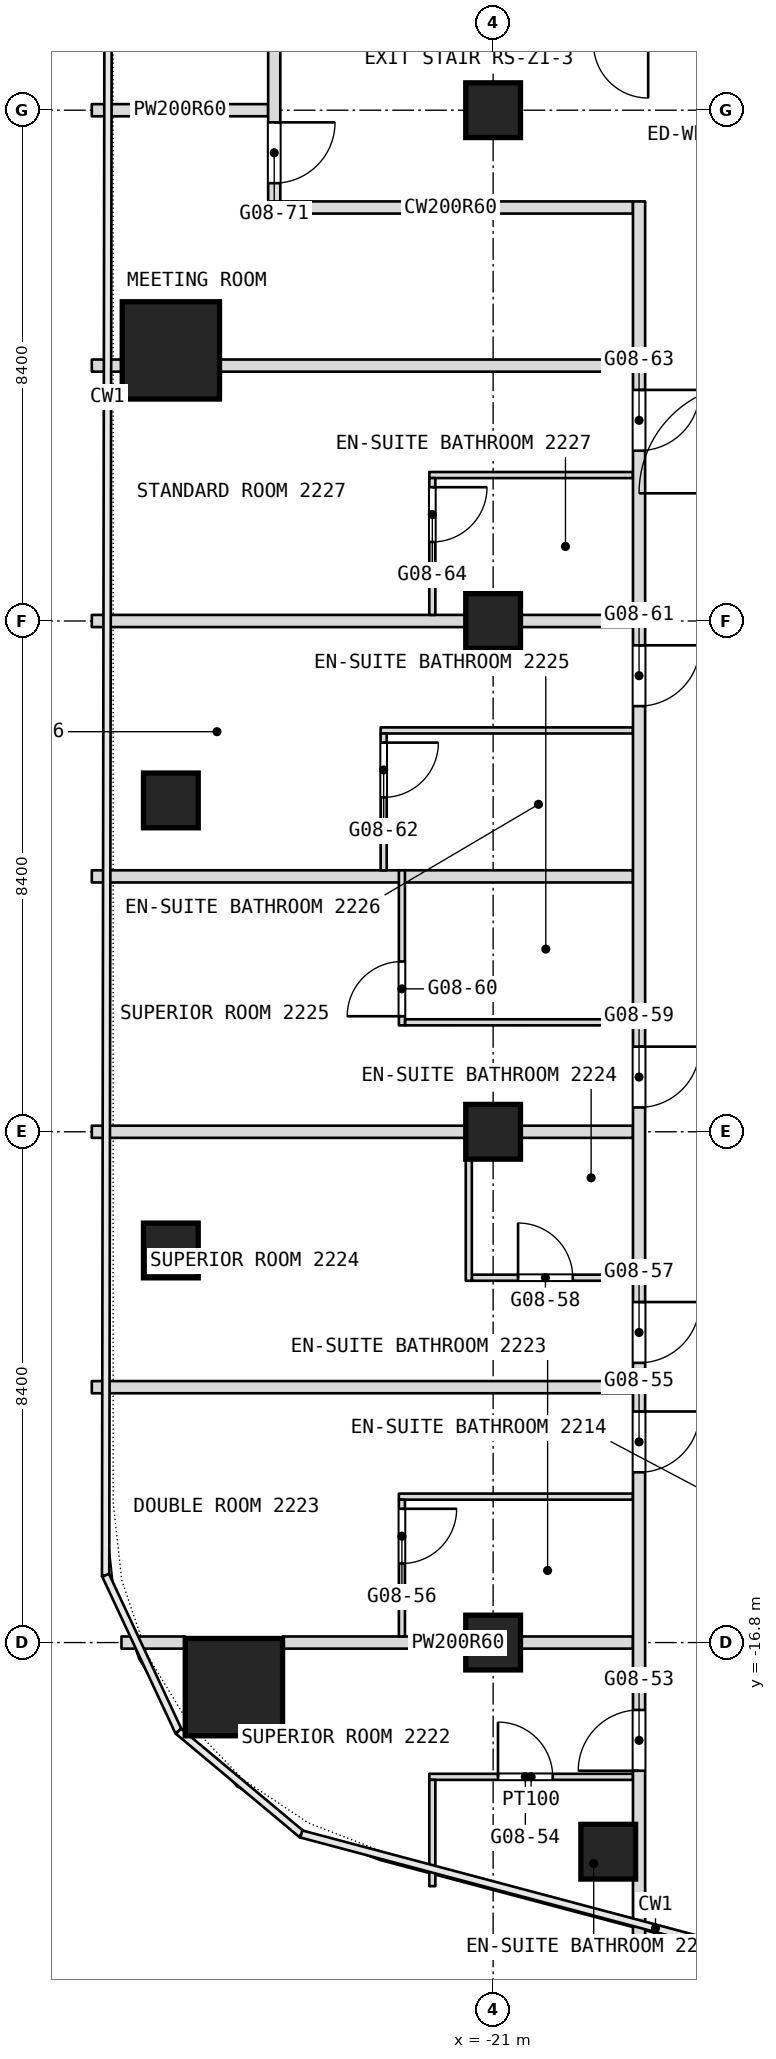
"""IFC4 building model, lengths in metres.
Left out: names, types, materials, properties, quantities, classifications, styles, units other than length and angle.
Written with IfcOpenShell. Run it as: python <this file> out.ifc"""

import sys

from ifc_helpers import new_model, si_unit, direction, frame, frame_2d, origin, origin_2d, place, context, subcontext, project, spatial, rectangle, extrude, element, fill, save


model = new_model("IFC4")
c1 = context("Model", 3, precision=1e-05, world=origin(), true_north=direction((0.0, 1.0)))
c2 = subcontext(c1, "Body", "Model", "MODEL_VIEW")
j1 = project(units=[si_unit("LENGTHUNIT", "METRE"), si_unit("PLANEANGLEUNIT", "RADIAN")], contexts=[c1])
p1 = place(None, origin())
s1 = spatial("IfcSite", under=j1, at=p1, CompositionType="ELEMENT")
p2 = place(p1, origin())
s2 = spatial("IfcBuilding", under=s1, at=p2, CompositionType="ELEMENT")
p3 = place(p2, frame((0.0, 0.0, 104.9)))
s3 = spatial("IfcBuildingStorey", under=s2, at=p3, CompositionType="ELEMENT", Elevation=104.9)
for number, where, z_axis, x_axis in (
    (1, (-25.263, -17.533, 0.0), (0.0, 0.0, 1.0), (1.0, 0.0, 0.0)),
    (2, (-26.3, 4.45, 0.0), (0.0, 0.0, 1.0), (1.0, 0.0, 0.0)),
):
    element("IfcColumn", number, at=place(p3, frame(where, z_axis=z_axis, x_axis=x_axis)), inside=s3, PredefinedType="COLUMN", context=c2, shape_type="SweptSolid", body=[
        extrude(rectangle(XDim=1.6, YDim=1.6, at=origin_2d()), origin(), (0.0, 0.0, 1.0), 3.6),
    ])
for number, where, z_axis, x_axis in (
    (3, (-21.0, -16.8, 0.0), (0.0, 0.0, 1.0), (1.0, 0.0, 0.0)),
    (4, (-21.0, -8.4, 0.0), (0.0, 0.0, 1.0), (1.0, 0.0, 0.0)),
    (5, (-21.0, 0.0, 0.0), (0.0, 0.0, 1.0), (1.0, 0.0, 0.0)),
    (6, (-21.0, 8.4, 0.0), (0.0, 0.0, 1.0), (1.0, 0.0, 0.0)),
    (7, (-26.3, -10.352, 0.0), (0.0, 0.0, 1.0), (1.0, 0.0, 0.0)),
    (8, (-26.3, -2.951, 0.0), (0.0, 0.0, 1.0), (1.0, 0.0, 0.0)),
    (9, (-19.107, -20.239, 0.0), (0.0, 0.0, 1.0), (1.0, 0.0, 0.0)),
):
    element("IfcColumn", number, at=place(p3, frame(where, z_axis=z_axis, x_axis=x_axis)), inside=s3, PredefinedType="COLUMN", context=c2, shape_type="SweptSolid", body=[
        extrude(rectangle(XDim=0.9, YDim=0.9, at=origin_2d()), origin(), (0.0, 0.0, 1.0), 3.6),
    ])
p4 = place(p3, frame((-22.05, -19.008, 0.0), z_axis=(0.0, 0.0, 1.0), x_axis=(1.0, 0.0, 0.0)))
e10 = element("IfcWall", 10, at=p4, inside=s3, PredefinedType="PARTITIONING", context=c2, shape_type="SweptSolid", body=[
    extrude(rectangle(XDim=3.35, YDim=0.1, at=frame_2d((1.675, 0.0))), origin(), (0.0, 0.0, 1.0), 3.34),
])
p5 = place(p4, frame((1.13, 0.0, 0.0)))
e11 = element("IfcOpeningElement", 11, at=p5, cuts=e10, PredefinedType="OPENING", context=c2, shape_type="SweptSolid", body=[
    extrude(rectangle(XDim=0.9, YDim=2.1, at=frame_2d((0.45, 1.05))), frame((0.0, 0.05, 0.0), z_axis=(0.0, -1.0, 0.0), x_axis=(1.0, 0.0, 0.0)), (0.0, 0.0, 1.0), 0.1),
])
p6 = place(p3, frame((-27.112, -16.8, 0.0), z_axis=(0.0, 0.0, 1.0), x_axis=(1.0, 0.0, 0.0)))
e12 = element("IfcWall", 12, at=p6, inside=s3, PredefinedType="PARTITIONING", context=c2, shape_type="SweptSolid", body=[
    extrude(rectangle(XDim=1.049, YDim=0.2, at=frame_2d((0.524, 0.0))), origin(), (0.0, 0.0, 1.0), 3.34),
])
p7 = place(p3, frame((-24.463, -16.8, 0.0), z_axis=(0.0, 0.0, 1.0), x_axis=(1.0, 0.0, 0.0)))
e13 = element("IfcWall", 13, at=p7, inside=s3, PredefinedType="PARTITIONING", context=c2, shape_type="SweptSolid", body=[
    extrude(rectangle(XDim=5.763, YDim=0.2, at=frame_2d((2.881, 0.0))), origin(), (0.0, 0.0, 1.0), 2.89),
])
p8 = place(p3, frame((-22.55, -14.4, 0.0), z_axis=(0.0, 0.0, 1.0), x_axis=(1.0, 0.0, 0.0)))
e14 = element("IfcWall", 14, at=p8, inside=s3, PredefinedType="PARTITIONING", context=c2, shape_type="SweptSolid", body=[
    extrude(rectangle(XDim=3.85, YDim=0.1, at=frame_2d((1.925, 0.0))), origin(), (0.0, 0.0, 1.0), 3.34),
])
p9 = place(p3, frame((-27.6, -12.6, 0.0), z_axis=(0.0, 0.0, 1.0), x_axis=(1.0, 0.0, 0.0)))
e15 = element("IfcWall", 15, at=p9, inside=s3, PredefinedType="PARTITIONING", context=c2, shape_type="SweptSolid", body=[
    extrude(rectangle(XDim=8.9, YDim=0.2, at=frame_2d((4.45, 0.0))), origin(), (0.0, 0.0, 1.0), 3.34),
])
p10 = place(p3, frame((-21.35, -10.8, 0.0), z_axis=(0.0, 0.0, 1.0), x_axis=(1.0, 0.0, 0.0)))
e16 = element("IfcWall", 16, at=p10, inside=s3, PredefinedType="PARTITIONING", context=c2, shape_type="SweptSolid", body=[
    extrude(rectangle(XDim=2.65, YDim=0.1, at=frame_2d((1.325, 0.0))), origin(), (0.0, 0.0, 1.0), 3.34),
])
p11 = place(p10, frame((0.76, 0.0, 0.0)))
e17 = element("IfcOpeningElement", 17, at=p11, cuts=e16, PredefinedType="OPENING", context=c2, shape_type="SweptSolid", body=[
    extrude(rectangle(XDim=0.9, YDim=2.1, at=frame_2d((0.45, 1.05))), frame((0.0, 0.05, 0.0), z_axis=(0.0, -1.0, 0.0), x_axis=(1.0, 0.0, 0.0)), (0.0, 0.0, 1.0), 0.1),
])
p12 = place(p3, frame((-27.6, -8.4, 0.0), z_axis=(0.0, 0.0, 1.0), x_axis=(1.0, 0.0, 0.0)))
e18 = element("IfcWall", 18, at=p12, inside=s3, PredefinedType="PARTITIONING", context=c2, shape_type="SweptSolid", body=[
    extrude(rectangle(XDim=8.9, YDim=0.2, at=frame_2d((4.45, 0.0))), origin(), (0.0, 0.0, 1.0), 2.89),
])
p13 = place(p3, frame((-22.45, -6.6, 0.0), z_axis=(0.0, 0.0, 1.0), x_axis=(1.0, 0.0, 0.0)))
e19 = element("IfcWall", 19, at=p13, inside=s3, PredefinedType="PARTITIONING", context=c2, shape_type="SweptSolid", body=[
    extrude(rectangle(XDim=3.75, YDim=0.1, at=frame_2d((1.875, 0.0))), origin(), (0.0, 0.0, 1.0), 3.34),
])
p14 = place(p3, frame((-27.6, -4.2, 0.0), z_axis=(0.0, 0.0, 1.0), x_axis=(1.0, 0.0, 0.0)))
e20 = element("IfcWall", 20, at=p14, inside=s3, PredefinedType="PARTITIONING", context=c2, shape_type="SweptSolid", body=[
    extrude(rectangle(XDim=8.9, YDim=0.2, at=frame_2d((4.45, 0.0))), origin(), (0.0, 0.0, 1.0), 3.34),
])
p15 = place(p3, frame((-22.85, -1.8, 0.0), z_axis=(0.0, 0.0, 1.0), x_axis=(1.0, 0.0, 0.0)))
e21 = element("IfcWall", 21, at=p15, inside=s3, PredefinedType="PARTITIONING", context=c2, shape_type="SweptSolid", body=[
    extrude(rectangle(XDim=4.15, YDim=0.1, at=frame_2d((2.075, 0.0))), origin(), (0.0, 0.0, 1.0), 3.34),
])
p16 = place(p3, frame((-27.6, 0.0, 0.0), z_axis=(0.0, 0.0, 1.0), x_axis=(1.0, 0.0, 0.0)))
e22 = element("IfcWall", 22, at=p16, inside=s3, PredefinedType="PARTITIONING", context=c2, shape_type="SweptSolid", body=[
    extrude(rectangle(XDim=8.9, YDim=0.2, at=frame_2d((4.45, 0.0))), origin(), (0.0, 0.0, 1.0), 2.89),
])
p17 = place(p3, frame((-22.05, 2.4, 0.0), z_axis=(0.0, 0.0, 1.0), x_axis=(1.0, 0.0, 0.0)))
e23 = element("IfcWall", 23, at=p17, inside=s3, PredefinedType="PARTITIONING", context=c2, shape_type="SweptSolid", body=[
    extrude(rectangle(XDim=3.35, YDim=0.1, at=frame_2d((1.675, 0.0))), origin(), (0.0, 0.0, 1.0), 3.34),
])
p18 = place(p3, frame((-27.6, 4.2, 0.0), z_axis=(0.0, 0.0, 1.0), x_axis=(1.0, 0.0, 0.0)))
e24 = element("IfcWall", 24, at=p18, inside=s3, PredefinedType="PARTITIONING", context=c2, shape_type="SweptSolid", body=[
    extrude(rectangle(XDim=0.5, YDim=0.2, at=frame_2d((0.25, 0.0))), origin(), (0.0, 0.0, 1.0), 3.34),
])
p19 = place(p3, frame((-25.5, 4.2, 0.0), z_axis=(0.0, 0.0, 1.0), x_axis=(1.0, 0.0, 0.0)))
e25 = element("IfcWall", 25, at=p19, inside=s3, PredefinedType="PARTITIONING", context=c2, shape_type="SweptSolid", body=[
    extrude(rectangle(XDim=6.8, YDim=0.2, at=frame_2d((3.4, 0.0))), origin(), (0.0, 0.0, 1.0), 3.34),
])
p20 = place(p3, frame((-24.7, 6.8, 0.0), z_axis=(0.0, 0.0, 1.0), x_axis=(1.0, 0.0, 0.0)))
e26 = element("IfcWall", 26, at=p20, inside=s3, PredefinedType="PARTITIONING", context=c2, shape_type="SweptSolid", body=[
    extrude(rectangle(XDim=6.0, YDim=0.2, at=frame_2d((3.0, 0.0))), origin(), (0.0, 0.0, 1.0), 3.34),
])
p21 = place(p3, frame((-27.6, 8.4, 0.0), z_axis=(0.0, 0.0, 1.0), x_axis=(1.0, 0.0, 0.0)))
e27 = element("IfcWall", 27, at=p21, inside=s3, PredefinedType="PARTITIONING", context=c2, shape_type="SweptSolid", body=[
    extrude(rectangle(XDim=2.9, YDim=0.2, at=frame_2d((1.45, 0.0))), origin(), (0.0, 0.0, 1.0), 2.89),
])
p22 = place(p3, frame((-18.6, -21.708, 0.0), z_axis=(0.0, 0.0, 1.0), x_axis=(0.0, 1.0, 0.0)))
e28 = element("IfcWall", 28, at=p22, inside=s3, PredefinedType="PARTITIONING", context=c2, shape_type="SweptSolid", body=[
    extrude(rectangle(XDim=28.608, YDim=0.2, at=frame_2d((14.304, 0.0))), origin(), (0.0, 0.0, 1.0), 3.34),
])
p23 = place(p22, frame((2.8, 0.0, 0.0)))
e29 = element("IfcOpeningElement", 29, at=p23, cuts=e28, PredefinedType="OPENING", context=c2, shape_type="SweptSolid", body=[
    extrude(rectangle(XDim=1.0, YDim=2.1, at=frame_2d((0.5, 1.05))), frame((0.0, 0.1, 0.0), z_axis=(0.0, -1.0, 0.0), x_axis=(1.0, 0.0, 0.0)), (0.0, 0.0, 1.0), 0.2),
])
p24 = place(p22, frame((7.708, 0.0, 0.0)))
e30 = element("IfcOpeningElement", 30, at=p24, cuts=e28, PredefinedType="OPENING", context=c2, shape_type="SweptSolid", body=[
    extrude(rectangle(XDim=1.0, YDim=2.1, at=frame_2d((0.5, 1.05))), frame((0.0, 0.1, 0.0), z_axis=(0.0, -1.0, 0.0), x_axis=(1.0, 0.0, 0.0)), (0.0, 0.0, 1.0), 0.2),
])
p25 = place(p22, frame((9.508, 0.0, 0.0)))
e31 = element("IfcOpeningElement", 31, at=p25, cuts=e28, PredefinedType="OPENING", context=c2, shape_type="SweptSolid", body=[
    extrude(rectangle(XDim=1.0, YDim=2.1, at=frame_2d((0.5, 1.05))), frame((0.0, 0.1, 0.0), z_axis=(0.0, -1.0, 0.0), x_axis=(1.0, 0.0, 0.0)), (0.0, 0.0, 1.0), 0.2),
])
p26 = place(p22, frame((13.708, 0.0, 0.0)))
e32 = element("IfcOpeningElement", 32, at=p26, cuts=e28, PredefinedType="OPENING", context=c2, shape_type="SweptSolid", body=[
    extrude(rectangle(XDim=1.0, YDim=2.1, at=frame_2d((0.5, 1.05))), frame((0.0, 0.1, 0.0), z_axis=(0.0, -1.0, 0.0), x_axis=(1.0, 0.0, 0.0)), (0.0, 0.0, 1.0), 0.2),
])
p27 = place(p22, frame((20.308, 0.0, 0.0)))
e33 = element("IfcOpeningElement", 33, at=p27, cuts=e28, PredefinedType="OPENING", context=c2, shape_type="SweptSolid", body=[
    extrude(rectangle(XDim=1.0, YDim=2.1, at=frame_2d((0.5, 1.05))), frame((0.0, 0.1, 0.0), z_axis=(0.0, -1.0, 0.0), x_axis=(1.0, 0.0, 0.0)), (0.0, 0.0, 1.0), 0.2),
])
p28 = place(p22, frame((24.508, 0.0, 0.0)))
e34 = element("IfcOpeningElement", 34, at=p28, cuts=e28, PredefinedType="OPENING", context=c2, shape_type="SweptSolid", body=[
    extrude(rectangle(XDim=1.0, YDim=2.1, at=frame_2d((0.5, 1.05))), frame((0.0, 0.1, 0.0), z_axis=(0.0, -1.0, 0.0), x_axis=(1.0, 0.0, 0.0)), (0.0, 0.0, 1.0), 0.2),
])
p29 = place(p3, frame((-21.4, -10.85, 0.0), z_axis=(0.0, 0.0, 1.0), x_axis=(0.0, 1.0, 0.0)))
e35 = element("IfcWall", 35, at=p29, inside=s3, PredefinedType="PARTITIONING", context=c2, shape_type="SweptSolid", body=[
    extrude(rectangle(XDim=2.55, YDim=0.1, at=frame_2d((1.275, 0.0))), origin(), (0.0, 0.0, 1.0), 3.34),
])
p30 = place(p3, frame((-22.0, -20.806, 0.0), z_axis=(0.0, 0.0, 1.0), x_axis=(0.0, 1.0, 0.0)))
e36 = element("IfcWall", 36, at=p30, inside=s3, PredefinedType="PARTITIONING", context=c2, shape_type="SweptSolid", body=[
    extrude(rectangle(XDim=1.748, YDim=0.1, at=frame_2d((0.874, 0.0))), origin(), (0.0, 0.0, 1.0), 3.34),
])
p31 = place(p3, frame((-22.0, 0.1, 0.0), z_axis=(0.0, 0.0, 1.0), x_axis=(0.0, 1.0, 0.0)))
e37 = element("IfcWall", 37, at=p31, inside=s3, PredefinedType="PARTITIONING", context=c2, shape_type="SweptSolid", body=[
    extrude(rectangle(XDim=2.25, YDim=0.1, at=frame_2d((1.125, 0.0))), origin(), (0.0, 0.0, 1.0), 3.34),
])
p32 = place(p31, frame((1.2, 0.0, 0.0)))
e38 = element("IfcOpeningElement", 38, at=p32, cuts=e37, PredefinedType="OPENING", context=c2, shape_type="SweptSolid", body=[
    extrude(rectangle(XDim=0.9, YDim=2.1, at=frame_2d((0.45, 1.05))), frame((0.0, 0.05, 0.0), z_axis=(0.0, -1.0, 0.0), x_axis=(1.0, 0.0, 0.0)), (0.0, 0.0, 1.0), 0.1),
])
p33 = place(p3, frame((-22.5, -16.7, 0.0), z_axis=(0.0, 0.0, 1.0), x_axis=(0.0, 1.0, 0.0)))
e39 = element("IfcWall", 39, at=p33, inside=s3, PredefinedType="PARTITIONING", context=c2, shape_type="SweptSolid", body=[
    extrude(rectangle(XDim=2.25, YDim=0.1, at=frame_2d((1.125, 0.0))), origin(), (0.0, 0.0, 1.0), 3.34),
])
p34 = place(p33, frame((1.2, 0.0, 0.0)))
e40 = element("IfcOpeningElement", 40, at=p34, cuts=e39, PredefinedType="OPENING", context=c2, shape_type="SweptSolid", body=[
    extrude(rectangle(XDim=0.9, YDim=2.1, at=frame_2d((0.45, 1.05))), frame((0.0, 0.05, 0.0), z_axis=(0.0, -1.0, 0.0), x_axis=(1.0, 0.0, 0.0)), (0.0, 0.0, 1.0), 0.1),
])
p35 = place(p3, frame((-22.5, -6.65, 0.0), z_axis=(0.0, 0.0, 1.0), x_axis=(0.0, 1.0, 0.0)))
e41 = element("IfcWall", 41, at=p35, inside=s3, PredefinedType="PARTITIONING", context=c2, shape_type="SweptSolid", body=[
    extrude(rectangle(XDim=2.55, YDim=0.1, at=frame_2d((1.275, 0.0))), origin(), (0.0, 0.0, 1.0), 3.34),
])
p36 = place(p35, frame((0.15, 0.0, 0.0)))
e42 = element("IfcOpeningElement", 42, at=p36, cuts=e41, PredefinedType="OPENING", context=c2, shape_type="SweptSolid", body=[
    extrude(rectangle(XDim=0.9, YDim=2.1, at=frame_2d((0.45, 1.05))), frame((0.0, 0.05, 0.0), z_axis=(0.0, -1.0, 0.0), x_axis=(1.0, 0.0, 0.0)), (0.0, 0.0, 1.0), 0.1),
])
p37 = place(p3, frame((-22.8, -4.1, 0.0), z_axis=(0.0, 0.0, 1.0), x_axis=(0.0, 1.0, 0.0)))
e43 = element("IfcWall", 43, at=p37, inside=s3, PredefinedType="PARTITIONING", context=c2, shape_type="SweptSolid", body=[
    extrude(rectangle(XDim=2.25, YDim=0.1, at=frame_2d((1.125, 0.0))), origin(), (0.0, 0.0, 1.0), 3.34),
])
p38 = place(p37, frame((1.2, 0.0, 0.0)))
e44 = element("IfcOpeningElement", 44, at=p38, cuts=e43, PredefinedType="OPENING", context=c2, shape_type="SweptSolid", body=[
    extrude(rectangle(XDim=0.9, YDim=2.1, at=frame_2d((0.45, 1.05))), frame((0.0, 0.05, 0.0), z_axis=(0.0, -1.0, 0.0), x_axis=(1.0, 0.0, 0.0)), (0.0, 0.0, 1.0), 0.1),
])
p39 = place(p3, frame((-24.6, 6.9, 0.0), z_axis=(0.0, 0.0, 1.0), x_axis=(0.0, 1.0, 0.0)))
e45 = element("IfcWall", 45, at=p39, inside=s3, PredefinedType="PARTITIONING", context=c2, shape_type="SweptSolid", body=[
    extrude(rectangle(XDim=11.6, YDim=0.2, at=frame_2d((5.8, 0.0))), origin(), (0.0, 0.0, 1.0), 3.34),
])
p40 = place(p39, frame((5.45, 0.0, 0.0)))
e46 = element("IfcOpeningElement", 46, at=p40, cuts=e45, PredefinedType="OPENING", context=c2, shape_type="SweptSolid", body=[
    extrude(rectangle(XDim=1.8, YDim=2.1, at=frame_2d((0.9, 1.05))), frame((0.0, 0.1, 0.0), z_axis=(0.0, -1.0, 0.0), x_axis=(1.0, 0.0, 0.0)), (0.0, 0.0, 1.0), 0.2),
])
p41 = place(p39, frame((0.3, 0.0, 0.0)))
e47 = element("IfcOpeningElement", 47, at=p41, cuts=e45, PredefinedType="OPENING", context=c2, shape_type="SweptSolid", body=[
    extrude(rectangle(XDim=1.0, YDim=2.1, at=frame_2d((0.5, 1.05))), frame((0.0, 0.1, 0.0), z_axis=(0.0, -1.0, 0.0), x_axis=(1.0, 0.0, 0.0)), (0.0, 0.0, 1.0), 0.2),
])
p42 = place(p5, origin())
e48 = element("IfcDoor", 48, at=p42, inside=s3, OperationType="SINGLE_SWING_LEFT", PredefinedType="DOOR", context=c2, shape_type="SweptSolid", body=[
    extrude(rectangle(XDim=0.9, YDim=2.1, at=frame_2d((0.45, 1.05))), frame((0.0, 0.025, 0.0), z_axis=(0.0, -1.0, 0.0), x_axis=(1.0, 0.0, 0.0)), (0.0, 0.0, 1.0), 0.05),
])
fill(e11, e48)
p43 = place(p11, origin())
e49 = element("IfcDoor", 49, at=p43, inside=s3, OperationType="SINGLE_SWING_LEFT", PredefinedType="DOOR", context=c2, shape_type="SweptSolid", body=[
    extrude(rectangle(XDim=0.9, YDim=2.1, at=frame_2d((0.45, 1.05))), frame((0.0, 0.025, 0.0), z_axis=(0.0, -1.0, 0.0), x_axis=(1.0, 0.0, 0.0)), (0.0, 0.0, 1.0), 0.05),
])
fill(e17, e49)
p44 = place(p23, origin())
e50 = element("IfcDoor", 50, at=p44, inside=s3, OperationType="SINGLE_SWING_LEFT", PredefinedType="DOOR", context=c2, shape_type="SweptSolid", body=[
    extrude(rectangle(XDim=1.0, YDim=2.1, at=frame_2d((0.5, 1.05))), frame((0.0, 0.025, 0.0), z_axis=(0.0, -1.0, 0.0), x_axis=(1.0, 0.0, 0.0)), (0.0, 0.0, 1.0), 0.05),
])
fill(e29, e50)
p45 = place(p24, origin())
e51 = element("IfcDoor", 51, at=p45, inside=s3, OperationType="SINGLE_SWING_RIGHT", PredefinedType="DOOR", context=c2, shape_type="SweptSolid", body=[
    extrude(rectangle(XDim=1.0, YDim=2.1, at=frame_2d((0.5, 1.05))), frame((0.0, 0.025, 0.0), z_axis=(0.0, -1.0, 0.0), x_axis=(1.0, 0.0, 0.0)), (0.0, 0.0, 1.0), 0.05),
])
fill(e30, e51)
p46 = place(p25, origin())
e52 = element("IfcDoor", 52, at=p46, inside=s3, OperationType="SINGLE_SWING_RIGHT", PredefinedType="DOOR", context=c2, shape_type="SweptSolid", body=[
    extrude(rectangle(XDim=1.0, YDim=2.1, at=frame_2d((0.5, 1.05))), frame((0.0, 0.025, 0.0), z_axis=(0.0, -1.0, 0.0), x_axis=(1.0, 0.0, 0.0)), (0.0, 0.0, 1.0), 0.05),
])
fill(e31, e52)
p47 = place(p26, origin())
e53 = element("IfcDoor", 53, at=p47, inside=s3, OperationType="SINGLE_SWING_RIGHT", PredefinedType="DOOR", context=c2, shape_type="SweptSolid", body=[
    extrude(rectangle(XDim=1.0, YDim=2.1, at=frame_2d((0.5, 1.05))), frame((0.0, 0.025, 0.0), z_axis=(0.0, -1.0, 0.0), x_axis=(1.0, 0.0, 0.0)), (0.0, 0.0, 1.0), 0.05),
])
fill(e32, e53)
p48 = place(p27, origin())
e54 = element("IfcDoor", 54, at=p48, inside=s3, OperationType="SINGLE_SWING_RIGHT", PredefinedType="DOOR", context=c2, shape_type="SweptSolid", body=[
    extrude(rectangle(XDim=1.0, YDim=2.1, at=frame_2d((0.5, 1.05))), frame((0.0, 0.025, 0.0), z_axis=(0.0, -1.0, 0.0), x_axis=(1.0, 0.0, 0.0)), (0.0, 0.0, 1.0), 0.05),
])
fill(e33, e54)
p49 = place(p28, origin())
e55 = element("IfcDoor", 55, at=p49, inside=s3, OperationType="SINGLE_SWING_RIGHT", PredefinedType="DOOR", context=c2, shape_type="SweptSolid", body=[
    extrude(rectangle(XDim=1.0, YDim=2.1, at=frame_2d((0.5, 1.05))), frame((0.0, 0.025, 0.0), z_axis=(0.0, -1.0, 0.0), x_axis=(1.0, 0.0, 0.0)), (0.0, 0.0, 1.0), 0.05),
])
fill(e34, e55)
p50 = place(p32, origin())
e56 = element("IfcDoor", 56, at=p50, inside=s3, OperationType="SINGLE_SWING_LEFT", PredefinedType="DOOR", context=c2, shape_type="SweptSolid", body=[
    extrude(rectangle(XDim=0.9, YDim=2.1, at=frame_2d((0.45, 1.05))), frame((0.0, 0.025, 0.0), z_axis=(0.0, -1.0, 0.0), x_axis=(1.0, 0.0, 0.0)), (0.0, 0.0, 1.0), 0.05),
])
fill(e38, e56)
p51 = place(p34, origin())
e57 = element("IfcDoor", 57, at=p51, inside=s3, OperationType="SINGLE_SWING_LEFT", PredefinedType="DOOR", context=c2, shape_type="SweptSolid", body=[
    extrude(rectangle(XDim=0.9, YDim=2.1, at=frame_2d((0.45, 1.05))), frame((0.0, 0.025, 0.0), z_axis=(0.0, -1.0, 0.0), x_axis=(1.0, 0.0, 0.0)), (0.0, 0.0, 1.0), 0.05),
])
fill(e40, e57)
p52 = place(p36, origin())
e58 = element("IfcDoor", 58, at=p52, inside=s3, OperationType="SINGLE_SWING_RIGHT", PredefinedType="DOOR", context=c2, shape_type="SweptSolid", body=[
    extrude(rectangle(XDim=0.9, YDim=2.1, at=frame_2d((0.45, 1.05))), frame((0.0, 0.025, 0.0), z_axis=(0.0, -1.0, 0.0), x_axis=(1.0, 0.0, 0.0)), (0.0, 0.0, 1.0), 0.05),
])
fill(e42, e58)
p53 = place(p38, origin())
e59 = element("IfcDoor", 59, at=p53, inside=s3, OperationType="SINGLE_SWING_LEFT", PredefinedType="DOOR", context=c2, shape_type="SweptSolid", body=[
    extrude(rectangle(XDim=0.9, YDim=2.1, at=frame_2d((0.45, 1.05))), frame((0.0, 0.025, 0.0), z_axis=(0.0, -1.0, 0.0), x_axis=(1.0, 0.0, 0.0)), (0.0, 0.0, 1.0), 0.05),
])
fill(e44, e59)
p54 = place(p41, origin())
e60 = element("IfcDoor", 60, at=p54, inside=s3, OperationType="SINGLE_SWING_LEFT", PredefinedType="DOOR", context=c2, shape_type="SweptSolid", body=[
    extrude(rectangle(XDim=1.0, YDim=2.1, at=frame_2d((0.5, 1.05))), frame((0.0, 0.025, 0.0), z_axis=(0.0, -1.0, 0.0), x_axis=(1.0, 0.0, 0.0)), (0.0, 0.0, 1.0), 0.05),
])
fill(e47, e60)
save(model, sys.argv[1])
